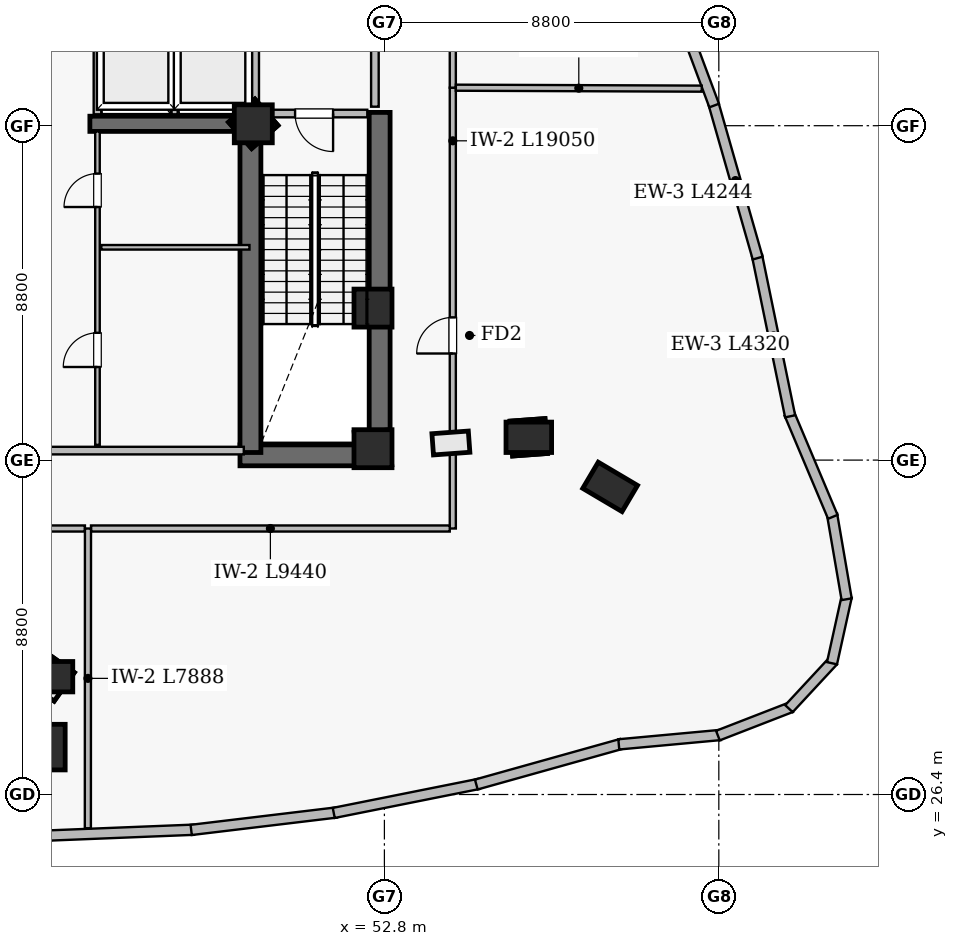
"""IFC4 building model, lengths in metres.
Left out: names, types, materials, properties, quantities, classifications, styles, units other than length and angle.
Written with IfcOpenShell. Run it as: python <this file> out.ifc"""

import sys

from ifc_helpers import new_model, si_unit, direction, frame, frame_2d, origin, origin_2d, place, context, subcontext, project, spatial, rectangle, extrude, element, fill, save


model = new_model("IFC4")
c1 = context("Model", 3, precision=1e-05, world=origin(), true_north=direction((0.0, 1.0)))
c2 = subcontext(c1, "Body", "Model", "MODEL_VIEW")
j1 = project(units=[si_unit("LENGTHUNIT", "METRE"), si_unit("PLANEANGLEUNIT", "RADIAN")], contexts=[c1])
p1 = place(None, origin())
s1 = spatial("IfcSite", under=j1, at=p1, CompositionType="ELEMENT")
p2 = place(p1, origin())
s2 = spatial("IfcBuilding", under=s1, at=p2, CompositionType="ELEMENT")
p3 = place(p2, frame((0.0, 0.0, 184.4)))
s3 = spatial("IfcBuildingStorey", under=s2, at=p3, CompositionType="ELEMENT", Elevation=184.4)
p4 = place(p3, frame((49.0, 35.325, 0.0), z_axis=(0.0, 0.0, 1.0), x_axis=(1.0, 0.0, 0.0)))
e1 = element("IfcWall", 1, at=p4, inside=s3, PredefinedType="SHEAR", context=c2, shape_type="SweptSolid", body=[
    extrude(rectangle(XDim=3.95, YDim=0.55, at=frame_2d((1.975, 0.0))), origin(), (0.0, 0.0, 1.0), 5.1),
])
p5 = place(p3, frame((52.675, 35.05, 0.0), z_axis=(0.0, 0.0, 1.0), x_axis=(0.0, 1.0, 0.0)))
e2 = element("IfcWall", 2, at=p5, inside=s3, PredefinedType="SHEAR", context=c2, shape_type="SweptSolid", body=[
    extrude(rectangle(XDim=9.3, YDim=0.55, at=frame_2d((4.65, 0.0))), origin(), (0.0, 0.0, 1.0), 5.1),
])
p6 = place(p3, frame((49.275, 35.4, 0.0), z_axis=(0.0, 0.0, 1.0), x_axis=(0.0, 1.0, 0.0)))
e3 = element("IfcWall", 3, at=p6, inside=s3, PredefinedType="SHEAR", context=c2, shape_type="SweptSolid", body=[
    extrude(rectangle(XDim=8.95, YDim=0.55, at=frame_2d((4.475, 0.0))), origin(), (0.0, 0.0, 1.0), 5.1),
])
p7 = place(p3, frame((45.05, 44.05, 0.0), z_axis=(0.0, 0.0, 1.0), x_axis=(1.0, 0.0, 0.0)))
e4 = element("IfcWall", 4, at=p7, inside=s3, PredefinedType="SHEAR", context=c2, shape_type="SweptSolid", body=[
    extrude(rectangle(XDim=4.2, YDim=0.4, at=frame_2d((2.1, 0.0))), origin(), (0.0, 0.0, 1.0), 5.1),
])
for number, where, z_axis, x_axis in (
    (5, (52.5, 35.5, 0.0), (0.0, 0.0, 1.0), (1.0, 0.0, 0.0)),
    (6, (52.5, 39.2, 0.0), (0.0, 0.0, 1.0), (1.0, 0.0, 0.0)),
    (7, (49.35, 44.05, 0.0), (0.0, 0.0, 1.0), (1.0, 0.0, 0.0)),
):
    element("IfcColumn", number, at=place(p3, frame(where, z_axis=z_axis, x_axis=x_axis)), inside=s3, PredefinedType="COLUMN", context=c2, shape_type="SweptSolid", body=[
        extrude(rectangle(XDim=1.0, YDim=1.0, at=origin_2d()), origin(), (0.0, 0.0, 1.0), 5.4),
    ])
for number, where, z_axis, x_axis in (
    (8, (56.6, 35.8, 0.0), (0.0, 0.0, 1.0), (1.0, 0.0, 0.0)),
    (9, (44.0, 29.5, 0.0), (0.0, 0.0, 1.0), (1.0, 0.0, 0.0)),
    (10, (58.74, 34.495, 0.0), (0.0, 0.0, 1.0), (-0.861, 0.509, 0.0)),
    (11, (44.0, 27.647, 0.0), (0.0, 0.0, 1.0), (0.0, 1.0, 0.0)),
):
    element("IfcColumn", number, at=place(p3, frame(where, z_axis=z_axis, x_axis=x_axis)), inside=s3, PredefinedType="COLUMN", context=c2, shape_type="SweptSolid", body=[
        extrude(rectangle(XDim=1.2, YDim=0.8, at=origin_2d()), origin(), (0.0, 0.0, 1.0), 5.4),
    ])
p8 = place(p3, frame((43.965, 25.321, 0.0), z_axis=(0.0, 0.0, 1.0), x_axis=(0.99920085672, 0.0399705883, 0.0)))
e12 = element("IfcWall", 12, at=p8, inside=s3, PredefinedType="SOLIDWALL", context=c2, shape_type="SweptSolid", body=[
    extrude(rectangle(XDim=3.824, YDim=0.27, at=frame_2d((1.912, 0.0))), origin(), (0.0, 0.0, 1.0), 5.1),
])
p9 = place(p3, frame((47.716, 25.468, 0.0), z_axis=(0.0, 0.0, 1.0), x_axis=(0.992875036937, 0.119160232577, 0.0)))
e13 = element("IfcWall", 13, at=p9, inside=s3, PredefinedType="SOLIDWALL", context=c2, shape_type="SweptSolid", body=[
    extrude(rectangle(XDim=3.848, YDim=0.27, at=frame_2d((1.924, 0.0))), origin(), (0.0, 0.0, 1.0), 5.1),
])
p10 = place(p3, frame((51.467, 25.915, 0.0), z_axis=(0.0, 0.0, 1.0), x_axis=(0.980578264817, 0.196128189121, 0.0)))
e14 = element("IfcWall", 14, at=p10, inside=s3, PredefinedType="SOLIDWALL", context=c2, shape_type="SweptSolid", body=[
    extrude(rectangle(XDim=3.895, YDim=0.27, at=frame_2d((1.948, 0.0))), origin(), (0.0, 0.0, 1.0), 5.1),
])
p11 = place(p3, frame((55.219, 26.663, 0.0), z_axis=(0.0, 0.0, 1.0), x_axis=(0.962978726961, 0.26957739412, 0.0)))
e15 = element("IfcWall", 15, at=p11, inside=s3, PredefinedType="SOLIDWALL", context=c2, shape_type="SweptSolid", body=[
    extrude(rectangle(XDim=3.965, YDim=0.27, at=frame_2d((1.982, 0.0))), origin(), (0.0, 0.0, 1.0), 5.1),
])
p12 = place(p3, frame((58.968, 27.719, 0.0), z_axis=(0.0, 0.0, 1.0), x_axis=(0.995762583404, 0.09196128257, 0.0)))
e16 = element("IfcWall", 16, at=p12, inside=s3, PredefinedType="SOLIDWALL", context=c2, shape_type="SweptSolid", body=[
    extrude(rectangle(XDim=2.687, YDim=0.27, at=frame_2d((1.343, 0.0))), origin(), (0.0, 0.0, 1.0), 5.1),
])
p13 = place(p3, frame((61.576, 27.95, 0.0), z_axis=(0.0, 0.0, 1.0), x_axis=(0.93229707956, 0.361693455074, 0.0)))
e17 = element("IfcWall", 17, at=p13, inside=s3, PredefinedType="SOLIDWALL", context=c2, shape_type="SweptSolid", body=[
    extrude(rectangle(XDim=2.066, YDim=0.27, at=frame_2d((1.033, 0.0))), origin(), (0.0, 0.0, 1.0), 5.1),
])
p14 = place(p3, frame((63.446, 28.659, 0.0), z_axis=(0.0, 0.0, 1.0), x_axis=(0.680078990902, 0.733138845058, 0.0)))
e18 = element("IfcWall", 18, at=p14, inside=s3, PredefinedType="SOLIDWALL", context=c2, shape_type="SweptSolid", body=[
    extrude(rectangle(XDim=1.712, YDim=0.27, at=frame_2d((0.856, 0.0))), origin(), (0.0, 0.0, 1.0), 5.1),
])
p15 = place(p3, frame((64.578, 29.854, 0.0), z_axis=(0.0, 0.0, 1.0), x_axis=(0.215792916571, 0.976439151795, 0.0)))
e19 = element("IfcWall", 19, at=p15, inside=s3, PredefinedType="SOLIDWALL", context=c2, shape_type="SweptSolid", body=[
    extrude(rectangle(XDim=1.795, YDim=0.27, at=frame_2d((0.898, 0.0))), origin(), (0.0, 0.0, 1.0), 5.1),
])
p16 = place(p3, frame((64.964, 31.539, 0.0), z_axis=(0.0, 0.0, 1.0), x_axis=(-0.169355267958, 0.985555068586, 0.0)))
e20 = element("IfcWall", 20, at=p16, inside=s3, PredefinedType="SOLIDWALL", context=c2, shape_type="SweptSolid", body=[
    extrude(rectangle(XDim=2.268, YDim=0.27, at=frame_2d((1.134, 0.0))), origin(), (0.0, 0.0, 1.0), 5.1),
])
p17 = place(p3, frame((64.599, 33.707, 0.0), z_axis=(0.0, 0.0, 1.0), x_axis=(-0.388546458819, 0.921429134193, 0.0)))
e21 = element("IfcWall", 21, at=p17, inside=s3, PredefinedType="SOLIDWALL", context=c2, shape_type="SweptSolid", body=[
    extrude(rectangle(XDim=2.943, YDim=0.27, at=frame_2d((1.472, 0.0))), origin(), (0.0, 0.0, 1.0), 5.1),
])
p18 = place(p3, frame((63.476, 36.353, 0.0), z_axis=(0.0, 0.0, 1.0), x_axis=(-0.201568414005, 0.979474437888, 0.0)))
e22 = element("IfcWall", 22, at=p18, inside=s3, PredefinedType="SOLIDWALL", context=c2, shape_type="SweptSolid", body=[
    extrude(rectangle(XDim=4.32, YDim=0.27, at=frame_2d((2.16, 0.0))), origin(), (0.0, 0.0, 1.0), 5.1),
])
p19 = place(p3, frame((62.622, 40.516, 0.0), z_axis=(0.0, 0.0, 1.0), x_axis=(-0.274964238992, 0.961454454083, 0.0)))
e23 = element("IfcWall", 23, at=p19, inside=s3, PredefinedType="SOLIDWALL", context=c2, shape_type="SweptSolid", body=[
    extrude(rectangle(XDim=4.244, YDim=0.27, at=frame_2d((2.122, 0.0))), origin(), (0.0, 0.0, 1.0), 5.1),
])
p20 = place(p3, frame((61.477, 44.53, 0.0), z_axis=(0.0, 0.0, 1.0), x_axis=(-0.349022784807, 0.937114238333, 0.0)))
e24 = element("IfcWall", 24, at=p20, inside=s3, PredefinedType="SOLIDWALL", context=c2, shape_type="SweptSolid", body=[
    extrude(rectangle(XDim=4.192, YDim=0.27, at=frame_2d((2.096, 0.0))), origin(), (0.0, 0.0, 1.0), 5.1),
])
p21 = place(p3, frame((54.6, 33.4, 0.0), z_axis=(0.0, 0.0, 1.0), x_axis=(0.0, 1.0, 0.0)))
e25 = element("IfcWall", 25, at=p21, inside=s3, PredefinedType="SOLIDWALL", context=c2, shape_type="SweptSolid", body=[
    extrude(rectangle(XDim=11.6, YDim=0.16, at=frame_2d((5.8, 0.0))), origin(), (0.0, 0.0, 1.0), 4.188),
])
p22 = place(p21, frame((4.605, 0.0, 0.0)))
e26 = element("IfcOpeningElement", 26, at=p22, cuts=e25, PredefinedType="OPENING", context=c2, shape_type="SweptSolid", body=[
    extrude(rectangle(XDim=0.95, YDim=2.15, at=frame_2d((0.475, 1.075))), frame((0.0, 0.09, 0.0), z_axis=(0.0, -1.0, 0.0), x_axis=(1.0, 0.0, 0.0)), (0.0, 0.0, 1.0), 0.18),
])
p23 = place(p3, frame((45.25, 35.6, 0.0), z_axis=(0.0, 0.0, 1.0), x_axis=(0.0, 1.0, 0.0)))
e27 = element("IfcWall", 27, at=p23, inside=s3, PredefinedType="PARTITIONING", context=c2, shape_type="SweptSolid", body=[
    extrude(rectangle(XDim=8.25, YDim=0.12, at=frame_2d((4.125, 0.0))), origin(), (0.0, 0.0, 1.0), 5.1),
])
p24 = place(p23, frame((2.05, 0.0, 0.0)))
e28 = element("IfcOpeningElement", 28, at=p24, cuts=e27, PredefinedType="OPENING", context=c2, shape_type="SweptSolid", body=[
    extrude(rectangle(XDim=0.9, YDim=2.1, at=frame_2d((0.45, 1.05))), frame((0.0, 0.07, 0.0), z_axis=(0.0, -1.0, 0.0), x_axis=(1.0, 0.0, 0.0)), (0.0, 0.0, 1.0), 0.14),
])
p25 = place(p23, frame((6.26, 0.0, 0.0)))
e29 = element("IfcOpeningElement", 29, at=p25, cuts=e27, PredefinedType="OPENING", context=c2, shape_type="SweptSolid", body=[
    extrude(rectangle(XDim=0.88, YDim=2.1, at=frame_2d((0.44, 1.05))), frame((0.0, 0.07, 0.0), z_axis=(0.0, -1.0, 0.0), x_axis=(1.0, 0.0, 0.0)), (0.0, 0.0, 1.0), 0.14),
])
p26 = place(p3, frame((52.55, 44.5, 0.0), z_axis=(0.0, 0.0, 1.0), x_axis=(0.0, 1.0, 0.0)))
e30 = element("IfcWall", 30, at=p26, inside=s3, PredefinedType="SOLIDWALL", context=c2, shape_type="SweptSolid", body=[
    extrude(rectangle(XDim=7.92, YDim=0.2, at=frame_2d((3.96, 0.0))), origin(), (0.0, 0.0, 1.0), 5.1),
])
p27 = place(p26, frame((2.6, 0.0, 0.0)))
e31 = element("IfcOpeningElement", 31, at=p27, cuts=e30, PredefinedType="OPENING", context=c2, shape_type="SweptSolid", body=[
    extrude(rectangle(XDim=1.0, YDim=2.15, at=frame_2d((0.5, 1.075))), frame((0.0, 0.11, 0.0), z_axis=(0.0, -1.0, 0.0), x_axis=(1.0, 0.0, 0.0)), (0.0, 0.0, 1.0), 0.22),
])
p28 = place(p3, frame((49.4, 44.5, 0.0), z_axis=(0.0, 0.0, 1.0), x_axis=(0.0, 1.0, 0.0)))
e32 = element("IfcWall", 32, at=p28, inside=s3, PredefinedType="SOLIDWALL", context=c2, shape_type="SweptSolid", body=[
    extrude(rectangle(XDim=7.92, YDim=0.2, at=frame_2d((3.96, 0.0))), origin(), (0.0, 0.0, 1.0), 4.188),
])
p29 = place(p28, frame((3.425, 0.0, 0.0)))
e33 = element("IfcOpeningElement", 33, at=p29, cuts=e32, PredefinedType="OPENING", context=c2, shape_type="SweptSolid", body=[
    extrude(rectangle(XDim=0.95, YDim=2.15, at=frame_2d((0.475, 1.075))), frame((0.0, 0.11, 0.0), z_axis=(0.0, -1.0, 0.0), x_axis=(1.0, 0.0, 0.0)), (0.0, 0.0, 1.0), 0.22),
])
p30 = place(p3, frame((54.6, 45.0, 0.0), z_axis=(0.0, 0.0, 1.0), x_axis=(0.0, 1.0, 0.0)))
e34 = element("IfcWall", 34, at=p30, inside=s3, PredefinedType="SOLIDWALL", context=c2, shape_type="SweptSolid", body=[
    extrude(rectangle(XDim=7.45, YDim=0.16, at=frame_2d((3.725, 0.0))), origin(), (0.0, 0.0, 1.0), 4.188),
])
p31 = place(p30, frame((3.25, 0.0, 0.0)))
e35 = element("IfcOpeningElement", 35, at=p31, cuts=e34, PredefinedType="OPENING", context=c2, shape_type="SweptSolid", body=[
    extrude(rectangle(XDim=0.95, YDim=2.15, at=frame_2d((0.475, 1.075))), frame((0.0, 0.09, 0.0), z_axis=(0.0, -1.0, 0.0), x_axis=(1.0, 0.0, 0.0)), (0.0, 0.0, 1.0), 0.18),
])
p32 = place(p3, frame((49.55, 44.32, 0.0), z_axis=(0.0, 0.0, 1.0), x_axis=(1.0, 0.0, 0.0)))
e36 = element("IfcWall", 36, at=p32, inside=s3, PredefinedType="SOLIDWALL", context=c2, shape_type="SweptSolid", body=[
    extrude(rectangle(XDim=2.8, YDim=0.2, at=frame_2d((1.4, 0.0))), origin(), (0.0, 0.0, 1.0), 4.188),
])
p33 = place(p32, frame((0.9, 0.0, 0.0)))
e37 = element("IfcOpeningElement", 37, at=p33, cuts=e36, PredefinedType="OPENING", context=c2, shape_type="SweptSolid", body=[
    extrude(rectangle(XDim=1.0, YDim=2.15, at=frame_2d((0.5, 1.075))), frame((0.0, 0.11, 0.0), z_axis=(0.0, -1.0, 0.0), x_axis=(1.0, 0.0, 0.0)), (0.0, 0.0, 1.0), 0.22),
])
p34 = place(p3, frame((33.48, 33.4, 0.0), z_axis=(0.0, 0.0, 1.0), x_axis=(1.0, 0.0, 0.0)))
e38 = element("IfcWall", 38, at=p34, inside=s3, PredefinedType="SOLIDWALL", context=c2, shape_type="SweptSolid", body=[
    extrude(rectangle(XDim=11.44, YDim=0.16, at=frame_2d((5.72, 0.0))), origin(), (0.0, 0.0, 1.0), 4.188),
])
p35 = place(p3, frame((38.9, 35.45, 0.0), z_axis=(0.0, 0.0, 1.0), x_axis=(1.0, 0.0, 0.0)))
e39 = element("IfcWall", 39, at=p35, inside=s3, PredefinedType="SOLIDWALL", context=c2, shape_type="SweptSolid", body=[
    extrude(rectangle(XDim=10.2, YDim=0.2, at=frame_2d((5.1, 0.0))), origin(), (0.0, 0.0, 1.0), 5.1),
])
p36 = place(p3, frame((45.08, 33.4, 0.0), z_axis=(0.0, 0.0, 1.0), x_axis=(1.0, 0.0, 0.0)))
e40 = element("IfcWall", 40, at=p36, inside=s3, PredefinedType="SOLIDWALL", context=c2, shape_type="SweptSolid", body=[
    extrude(rectangle(XDim=9.44, YDim=0.16, at=frame_2d((4.72, 0.0))), origin(), (0.0, 0.0, 1.0), 4.188),
])
p37 = place(p3, frame((44.997, 25.512, 0.0), z_axis=(0.0, 0.0, 1.0), x_axis=(0.000371413512, 0.999999931026, 0.0)))
e41 = element("IfcWall", 41, at=p37, inside=s3, PredefinedType="SOLIDWALL", context=c2, shape_type="SweptSolid", body=[
    extrude(rectangle(XDim=7.888, YDim=0.16, at=frame_2d((3.944, 0.0))), origin(), (0.0, 0.0, 1.0), 4.188),
])
p38 = place(p3, frame((61.151, 44.975, 0.0), z_axis=(0.0, 0.0, 1.0), x_axis=(-0.999992595258, 0.003848302008, 0.0)))
e42 = element("IfcWall", 42, at=p38, inside=s3, PredefinedType="SOLIDWALL", context=c2, shape_type="SweptSolid", body=[
    extrude(rectangle(XDim=6.471, YDim=0.16, at=frame_2d((3.235, 0.0))), origin(), (0.0, 0.0, 1.0), 4.188),
])
p39 = place(p3, frame((45.35, 40.8, 0.0), z_axis=(0.0, 0.0, 1.0), x_axis=(1.0, 0.0, 0.0)))
e43 = element("IfcWall", 43, at=p39, inside=s3, PredefinedType="PARTITIONING", context=c2, shape_type="SweptSolid", body=[
    extrude(rectangle(XDim=3.9, YDim=0.12, at=frame_2d((1.95, 0.0))), origin(), (0.0, 0.0, 1.0), 5.1),
])
p40 = place(p3, frame((45.25, 44.3, 0.0), z_axis=(0.0, 0.0, 1.0), x_axis=(0.0, 1.0, 0.0)))
e44 = element("IfcWall", 44, at=p40, inside=s3, PredefinedType="SOLIDWALL", context=c2, shape_type="SweptSolid", body=[
    extrude(rectangle(XDim=2.58, YDim=0.2, at=frame_2d((1.29, 0.0))), origin(), (0.0, 0.0, 1.0), 5.1),
])
p41 = place(p3, frame((47.28, 44.3, 0.0), z_axis=(0.0, 0.0, 1.0), x_axis=(0.0, 1.0, 0.0)))
e45 = element("IfcWall", 45, at=p41, inside=s3, PredefinedType="SOLIDWALL", context=c2, shape_type="SweptSolid", body=[
    extrude(rectangle(XDim=2.55, YDim=0.16, at=frame_2d((1.275, 0.0))), origin(), (0.0, 0.0, 1.0), 4.188),
])
p42 = place(p33, frame((1.0, 0.0, 0.0), z_axis=(0.0, 0.0, 1.0), x_axis=(-1.0, 0.0, 0.0)))
e46 = element("IfcDoor", 46, at=p42, inside=s3, OperationType="SINGLE_SWING_RIGHT", PredefinedType="DOOR", context=c2, shape_type="SweptSolid", body=[
    extrude(rectangle(XDim=1.0, YDim=2.15, at=frame_2d((0.5, 1.075))), frame((0.0, 0.025, 0.0), z_axis=(0.0, -1.0, 0.0), x_axis=(1.0, 0.0, 0.0)), (0.0, 0.0, 1.0), 0.05),
])
fill(e37, e46)
p43 = place(p24, origin())
e47 = element("IfcDoor", 47, at=p43, inside=s3, OperationType="SINGLE_SWING_LEFT", PredefinedType="DOOR", context=c2, shape_type="SweptSolid", body=[
    extrude(rectangle(XDim=0.9, YDim=2.1, at=frame_2d((0.45, 1.05))), frame((0.0, 0.025, 0.0), z_axis=(0.0, -1.0, 0.0), x_axis=(1.0, 0.0, 0.0)), (0.0, 0.0, 1.0), 0.05),
])
fill(e28, e47)
p44 = place(p25, origin())
e48 = element("IfcDoor", 48, at=p44, inside=s3, OperationType="SINGLE_SWING_LEFT", PredefinedType="DOOR", context=c2, shape_type="SweptSolid", body=[
    extrude(rectangle(XDim=0.88, YDim=2.1, at=frame_2d((0.44, 1.05))), frame((0.0, 0.025, 0.0), z_axis=(0.0, -1.0, 0.0), x_axis=(1.0, 0.0, 0.0)), (0.0, 0.0, 1.0), 0.05),
])
fill(e29, e48)
p45 = place(p22, origin())
e49 = element("IfcDoor", 49, at=p45, inside=s3, OperationType="SINGLE_SWING_LEFT", PredefinedType="DOOR", context=c2, shape_type="SweptSolid", body=[
    extrude(rectangle(XDim=0.95, YDim=2.15, at=frame_2d((0.475, 1.075))), frame((0.0, 0.025, 0.0), z_axis=(0.0, -1.0, 0.0), x_axis=(1.0, 0.0, 0.0)), (0.0, 0.0, 1.0), 0.05),
])
fill(e26, e49)
save(model, sys.argv[1])
